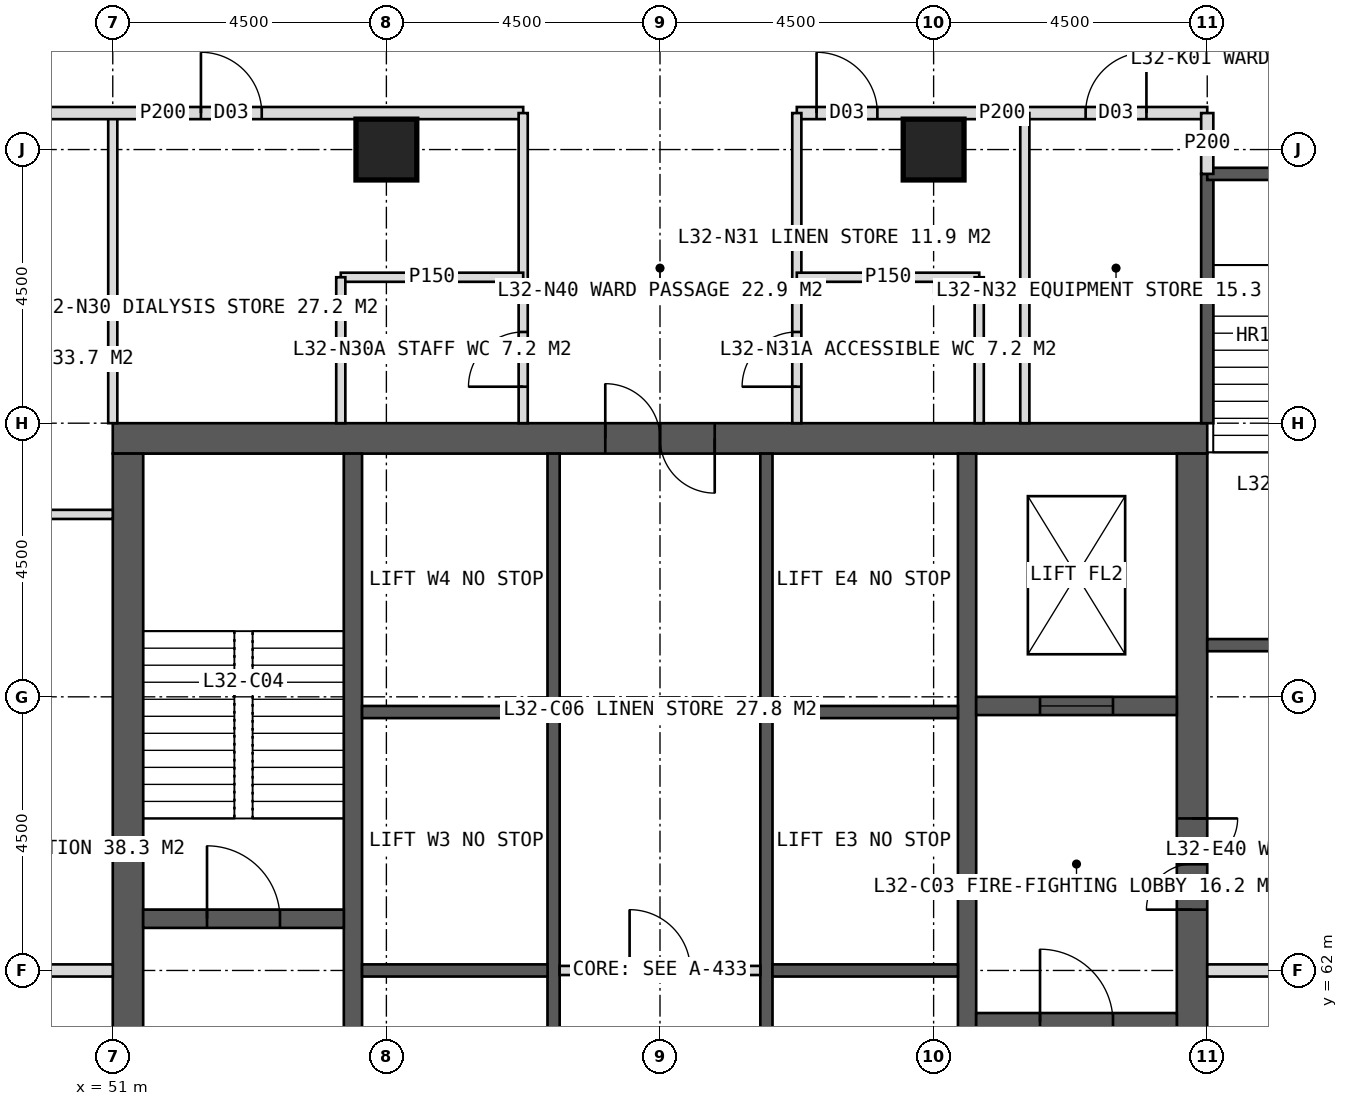
"""IFC4 building model, lengths in metres.
Left out: names, types, materials, properties, quantities, classifications, styles, units other than length and angle.
Written with IfcOpenShell. Run it as: python <this file> out.ifc"""

import sys

from ifc_helpers import new_model, si_unit, direction, frame, frame_2d, origin, origin_2d, place, context, subcontext, project, spatial, rectangle, hollow_rectangle, extrude, element, fill, save


model = new_model("IFC4")
c1 = context("Model", 3, precision=1e-05, world=origin(), true_north=direction((0.0, 1.0)))
c2 = subcontext(c1, "Body", "Model", "MODEL_VIEW")
j1 = project(units=[si_unit("LENGTHUNIT", "METRE"), si_unit("PLANEANGLEUNIT", "RADIAN")], contexts=[c1])
p1 = place(None, origin())
s1 = spatial("IfcSite", under=j1, at=p1, CompositionType="ELEMENT")
p2 = place(p1, origin())
s2 = spatial("IfcBuilding", under=s1, at=p2, CompositionType="ELEMENT")
p3 = place(p2, frame((0.0, 0.0, 136.0)))
s3 = spatial("IfcBuildingStorey", under=s2, at=p3, CompositionType="ELEMENT", Elevation=136.0)
p4 = place(p3, frame((51.0, 70.75, 0.0), z_axis=(0.0, 0.0, 1.0), x_axis=(1.0, 0.0, 0.0)))
e1 = element("IfcWall", 1, at=p4, inside=s3, PredefinedType="SHEAR", context=c2, shape_type="SweptSolid", body=[
    extrude(rectangle(XDim=18.0, YDim=0.5, at=frame_2d((9.0, 0.0))), origin(), (0.0, 0.0, 1.0), 4.0),
])
p5 = place(p4, frame((8.1, 0.0, 0.0)))
e2 = element("IfcOpeningElement", 2, at=p5, cuts=e1, PredefinedType="OPENING", context=c2, shape_type="SweptSolid", body=[
    extrude(rectangle(XDim=1.8, YDim=2.2, at=frame_2d((0.9, 1.1))), frame((0.0, 0.26, 0.0), z_axis=(0.0, -1.0, 0.0), x_axis=(1.0, 0.0, 0.0)), (0.0, 0.0, 1.0), 0.52),
])
p6 = place(p3, frame((51.25, 53.5, 0.0), z_axis=(0.0, 0.0, 1.0), x_axis=(0.0, 1.0, 0.0)))
e3 = element("IfcWall", 3, at=p6, inside=s3, PredefinedType="SHEAR", context=c2, shape_type="SweptSolid", body=[
    extrude(rectangle(XDim=17.0, YDim=0.5, at=frame_2d((8.5, 0.0))), origin(), (0.0, 0.0, 1.0), 4.0),
])
p7 = place(p6, frame((6.0, 0.0, 0.0)))
e4 = element("IfcOpeningElement", 4, at=p7, cuts=e3, PredefinedType="OPENING", context=c2, shape_type="SweptSolid", body=[
    extrude(rectangle(XDim=1.5, YDim=2.2, at=frame_2d((0.75, 1.1))), frame((0.0, 0.26, 0.0), z_axis=(0.0, -1.0, 0.0), x_axis=(1.0, 0.0, 0.0)), (0.0, 0.0, 1.0), 0.52),
])
p8 = place(p3, frame((68.75, 53.5, 0.0), z_axis=(0.0, 0.0, 1.0), x_axis=(0.0, 1.0, 0.0)))
e5 = element("IfcWall", 5, at=p8, inside=s3, PredefinedType="SHEAR", context=c2, shape_type="SweptSolid", body=[
    extrude(rectangle(XDim=17.0, YDim=0.5, at=frame_2d((8.5, 0.0))), origin(), (0.0, 0.0, 1.0), 4.0),
])
p9 = place(p8, frame((9.5, 0.0, 0.0)))
e6 = element("IfcOpeningElement", 6, at=p9, cuts=e5, PredefinedType="OPENING", context=c2, shape_type="SweptSolid", body=[
    extrude(rectangle(XDim=1.5, YDim=2.2, at=frame_2d((0.75, 1.1))), frame((0.0, 0.26, 0.0), z_axis=(0.0, -1.0, 0.0), x_axis=(1.0, 0.0, 0.0)), (0.0, 0.0, 1.0), 0.52),
])
for number, where, z_axis, x_axis in (
    (7, (54.95, 53.5, 0.0), (0.0, 0.0, 1.0), (0.0, 1.0, 0.0)),
    (8, (65.05, 53.5, 0.0), (0.0, 0.0, 1.0), (0.0, 1.0, 0.0)),
):
    element("IfcWall", number, at=place(p3, frame(where, z_axis=z_axis, x_axis=x_axis)), inside=s3, PredefinedType="SHEAR", context=c2, shape_type="SweptSolid", body=[
        extrude(rectangle(XDim=17.0, YDim=0.3, at=frame_2d((8.5, 0.0))), origin(), (0.0, 0.0, 1.0), 4.0),
    ])
p10 = place(p3, frame((58.25, 53.5, 0.0), z_axis=(0.0, 0.0, 1.0), x_axis=(0.0, 1.0, 0.0)))
e9 = element("IfcWall", 9, at=p10, inside=s3, PredefinedType="SHEAR", context=c2, shape_type="SweptSolid", body=[
    extrude(rectangle(XDim=17.0, YDim=0.2, at=frame_2d((8.5, 0.0))), origin(), (0.0, 0.0, 1.0), 4.0),
])
p11 = place(p10, frame((1.375, 0.0, 0.0)))
e10 = element("IfcOpeningElement", 10, at=p11, cuts=e9, PredefinedType="OPENING", context=c2, shape_type="SweptSolid", body=[
    extrude(rectangle(XDim=1.4, YDim=2.2, at=frame_2d((0.7, 1.1))), frame((0.0, 0.11, 0.0), z_axis=(0.0, -1.0, 0.0), x_axis=(1.0, 0.0, 0.0)), (0.0, 0.0, 1.0), 0.22),
])
p12 = place(p10, frame((5.675, 0.0, 0.0)))
e11 = element("IfcOpeningElement", 11, at=p12, cuts=e9, PredefinedType="OPENING", context=c2, shape_type="SweptSolid", body=[
    extrude(rectangle(XDim=1.4, YDim=2.2, at=frame_2d((0.7, 1.1))), frame((0.0, 0.11, 0.0), z_axis=(0.0, -1.0, 0.0), x_axis=(1.0, 0.0, 0.0)), (0.0, 0.0, 1.0), 0.22),
])
p13 = place(p3, frame((61.75, 53.5, 0.0), z_axis=(0.0, 0.0, 1.0), x_axis=(0.0, 1.0, 0.0)))
e12 = element("IfcWall", 12, at=p13, inside=s3, PredefinedType="SHEAR", context=c2, shape_type="SweptSolid", body=[
    extrude(rectangle(XDim=17.0, YDim=0.2, at=frame_2d((8.5, 0.0))), origin(), (0.0, 0.0, 1.0), 4.0),
])
p14 = place(p13, frame((1.375, 0.0, 0.0)))
e13 = element("IfcOpeningElement", 13, at=p14, cuts=e12, PredefinedType="OPENING", context=c2, shape_type="SweptSolid", body=[
    extrude(rectangle(XDim=1.4, YDim=2.2, at=frame_2d((0.7, 1.1))), frame((0.0, 0.11, 0.0), z_axis=(0.0, -1.0, 0.0), x_axis=(1.0, 0.0, 0.0)), (0.0, 0.0, 1.0), 0.22),
])
p15 = place(p13, frame((5.675, 0.0, 0.0)))
e14 = element("IfcOpeningElement", 14, at=p15, cuts=e12, PredefinedType="OPENING", context=c2, shape_type="SweptSolid", body=[
    extrude(rectangle(XDim=1.4, YDim=2.2, at=frame_2d((0.7, 1.1))), frame((0.0, 0.11, 0.0), z_axis=(0.0, -1.0, 0.0), x_axis=(1.0, 0.0, 0.0)), (0.0, 0.0, 1.0), 0.22),
])
for number, where, z_axis, x_axis in (
    (15, (55.1, 62.0, 0.0), (0.0, 0.0, 1.0), (1.0, 0.0, 0.0)),
    (16, (61.85, 62.0, 0.0), (0.0, 0.0, 1.0), (1.0, 0.0, 0.0)),
    (17, (55.1, 66.25, 0.0), (0.0, 0.0, 1.0), (1.0, 0.0, 0.0)),
    (18, (61.85, 66.25, 0.0), (0.0, 0.0, 1.0), (1.0, 0.0, 0.0)),
):
    element("IfcWall", number, at=place(p3, frame(where, z_axis=z_axis, x_axis=x_axis)), inside=s3, PredefinedType="SHEAR", context=c2, shape_type="SweptSolid", body=[
        extrude(rectangle(XDim=3.05, YDim=0.2, at=frame_2d((1.525, 0.0))), origin(), (0.0, 0.0, 1.0), 4.0),
    ])
p16 = place(p3, frame((51.5, 62.85, 0.0), z_axis=(0.0, 0.0, 1.0), x_axis=(1.0, 0.0, 0.0)))
e19 = element("IfcWall", 19, at=p16, inside=s3, PredefinedType="SHEAR", context=c2, shape_type="SweptSolid", body=[
    extrude(rectangle(XDim=3.3, YDim=0.3, at=frame_2d((1.65, 0.0))), origin(), (0.0, 0.0, 1.0), 4.0),
])
p17 = place(p16, frame((1.05, 0.0, 0.0)))
e20 = element("IfcOpeningElement", 20, at=p17, cuts=e19, PredefinedType="OPENING", context=c2, shape_type="SweptSolid", body=[
    extrude(rectangle(XDim=1.2, YDim=2.1, at=frame_2d((0.6, 1.05))), frame((0.0, 0.16, 0.0), z_axis=(0.0, -1.0, 0.0), x_axis=(1.0, 0.0, 0.0)), (0.0, 0.0, 1.0), 0.32),
])
p18 = place(p3, frame((65.2, 61.15, 0.0), z_axis=(0.0, 0.0, 1.0), x_axis=(1.0, 0.0, 0.0)))
e21 = element("IfcWall", 21, at=p18, inside=s3, PredefinedType="SHEAR", context=c2, shape_type="SweptSolid", body=[
    extrude(rectangle(XDim=3.3, YDim=0.3, at=frame_2d((1.65, 0.0))), origin(), (0.0, 0.0, 1.0), 4.0),
])
p19 = place(p18, frame((1.05, 0.0, 0.0)))
e22 = element("IfcOpeningElement", 22, at=p19, cuts=e21, PredefinedType="OPENING", context=c2, shape_type="SweptSolid", body=[
    extrude(rectangle(XDim=1.2, YDim=2.1, at=frame_2d((0.6, 1.05))), frame((0.0, 0.16, 0.0), z_axis=(0.0, -1.0, 0.0), x_axis=(1.0, 0.0, 0.0)), (0.0, 0.0, 1.0), 0.32),
])
p20 = place(p3, frame((65.2, 66.35, 0.0), z_axis=(0.0, 0.0, 1.0), x_axis=(1.0, 0.0, 0.0)))
e23 = element("IfcWall", 23, at=p20, inside=s3, PredefinedType="SHEAR", context=c2, shape_type="SweptSolid", body=[
    extrude(rectangle(XDim=3.3, YDim=0.3, at=frame_2d((1.65, 0.0))), origin(), (0.0, 0.0, 1.0), 4.0),
])
p21 = place(p20, frame((1.05, 0.0, 0.0)))
e24 = element("IfcOpeningElement", 24, at=p21, cuts=e23, PredefinedType="OPENING", context=c2, shape_type="SweptSolid", body=[
    extrude(rectangle(XDim=1.2, YDim=2.2, at=frame_2d((0.6, 1.1))), frame((0.0, 0.16, 0.0), z_axis=(0.0, -1.0, 0.0), x_axis=(1.0, 0.0, 0.0)), (0.0, 0.0, 1.0), 0.32),
])
for number, where, z_axis, x_axis in (
    (25, (55.5, 75.5, 0.0), (0.0, 0.0, 1.0), (1.0, 0.0, 0.0)),
    (26, (64.5, 75.5, 0.0), (0.0, 0.0, 1.0), (1.0, 0.0, 0.0)),
):
    element("IfcColumn", number, at=place(p3, frame(where, z_axis=z_axis, x_axis=x_axis)), inside=s3, PredefinedType="COLUMN", context=c2, shape_type="SweptSolid", body=[
        extrude(hollow_rectangle(XDim=1.0, YDim=1.0, WallThickness=0.1, at=origin_2d()), origin(), (0.0, 0.0, 1.0), 4.0),
    ])
p22 = place(p3, frame((51.0, 71.0, 0.0), z_axis=(0.0, 0.0, 1.0), x_axis=(0.0, 1.0, 0.0)))
e27 = element("IfcWall", 27, at=p22, inside=s3, PredefinedType="PARTITIONING", context=c2, shape_type="SweptSolid", body=[
    extrude(rectangle(XDim=5.1, YDim=0.15, at=frame_2d((2.55, 0.0))), origin(), (0.0, 0.0, 1.0), 3.75),
])
p23 = place(p3, frame((45.9, 76.1, 0.0), z_axis=(0.0, 0.0, 1.0), x_axis=(1.0, 0.0, 0.0)))
e28 = element("IfcWall", 28, at=p23, inside=s3, PredefinedType="PARTITIONING", context=c2, shape_type="SweptSolid", body=[
    extrude(rectangle(XDim=11.85, YDim=0.2, at=frame_2d((5.925, 0.0))), origin(), (0.0, 0.0, 1.0), 3.75),
])
p24 = place(p23, frame((6.55, 0.0, 0.0)))
e29 = element("IfcOpeningElement", 29, at=p24, cuts=e28, PredefinedType="OPENING", context=c2, shape_type="SweptSolid", body=[
    extrude(rectangle(XDim=1.0, YDim=2.1, at=frame_2d((0.5, 1.05))), frame((0.0, 0.11, 0.0), z_axis=(0.0, -1.0, 0.0), x_axis=(1.0, 0.0, 0.0)), (0.0, 0.0, 1.0), 0.22),
])
p25 = place(p3, frame((62.25, 76.1, 0.0), z_axis=(0.0, 0.0, 1.0), x_axis=(1.0, 0.0, 0.0)))
e30 = element("IfcWall", 30, at=p25, inside=s3, PredefinedType="PARTITIONING", context=c2, shape_type="SweptSolid", body=[
    extrude(rectangle(XDim=6.75, YDim=0.2, at=frame_2d((3.375, 0.0))), origin(), (0.0, 0.0, 1.0), 3.75),
])
p26 = place(p25, frame((0.325, 0.0, 0.0)))
e31 = element("IfcOpeningElement", 31, at=p26, cuts=e30, PredefinedType="OPENING", context=c2, shape_type="SweptSolid", body=[
    extrude(rectangle(XDim=1.0, YDim=2.1, at=frame_2d((0.5, 1.05))), frame((0.0, 0.11, 0.0), z_axis=(0.0, -1.0, 0.0), x_axis=(1.0, 0.0, 0.0)), (0.0, 0.0, 1.0), 0.22),
])
p27 = place(p25, frame((4.75, 0.0, 0.0)))
e32 = element("IfcOpeningElement", 32, at=p27, cuts=e30, PredefinedType="OPENING", context=c2, shape_type="SweptSolid", body=[
    extrude(rectangle(XDim=1.0, YDim=2.1, at=frame_2d((0.5, 1.05))), frame((0.0, 0.11, 0.0), z_axis=(0.0, -1.0, 0.0), x_axis=(1.0, 0.0, 0.0)), (0.0, 0.0, 1.0), 0.22),
])
p28 = place(p3, frame((57.75, 71.0, 0.0), z_axis=(0.0, 0.0, 1.0), x_axis=(0.0, 1.0, 0.0)))
e33 = element("IfcWall", 33, at=p28, inside=s3, PredefinedType="PARTITIONING", context=c2, shape_type="SweptSolid", body=[
    extrude(rectangle(XDim=5.1, YDim=0.15, at=frame_2d((2.55, 0.0))), origin(), (0.0, 0.0, 1.0), 3.75),
])
p29 = place(p28, frame((0.6, 0.0, 0.0)))
e34 = element("IfcOpeningElement", 34, at=p29, cuts=e33, PredefinedType="OPENING", context=c2, shape_type="SweptSolid", body=[
    extrude(rectangle(XDim=0.9, YDim=2.1, at=frame_2d((0.45, 1.05))), frame((0.0, 0.085, 0.0), z_axis=(0.0, -1.0, 0.0), x_axis=(1.0, 0.0, 0.0)), (0.0, 0.0, 1.0), 0.17),
])
p30 = place(p3, frame((62.25, 71.0, 0.0), z_axis=(0.0, 0.0, 1.0), x_axis=(0.0, 1.0, 0.0)))
e35 = element("IfcWall", 35, at=p30, inside=s3, PredefinedType="PARTITIONING", context=c2, shape_type="SweptSolid", body=[
    extrude(rectangle(XDim=5.1, YDim=0.15, at=frame_2d((2.55, 0.0))), origin(), (0.0, 0.0, 1.0), 3.75),
])
p31 = place(p30, frame((0.6, 0.0, 0.0)))
e36 = element("IfcOpeningElement", 36, at=p31, cuts=e35, PredefinedType="OPENING", context=c2, shape_type="SweptSolid", body=[
    extrude(rectangle(XDim=0.9, YDim=2.1, at=frame_2d((0.45, 1.05))), frame((0.0, 0.085, 0.0), z_axis=(0.0, -1.0, 0.0), x_axis=(1.0, 0.0, 0.0)), (0.0, 0.0, 1.0), 0.17),
])
p32 = place(p3, frame((66.0, 71.0, 0.0), z_axis=(0.0, 0.0, 1.0), x_axis=(0.0, 1.0, 0.0)))
e37 = element("IfcWall", 37, at=p32, inside=s3, PredefinedType="PARTITIONING", context=c2, shape_type="SweptSolid", body=[
    extrude(rectangle(XDim=5.1, YDim=0.15, at=frame_2d((2.55, 0.0))), origin(), (0.0, 0.0, 1.0), 3.75),
])
p33 = place(p3, frame((54.75, 73.4, 0.0), z_axis=(0.0, 0.0, 1.0), x_axis=(1.0, 0.0, 0.0)))
e38 = element("IfcWall", 38, at=p33, inside=s3, PredefinedType="PARTITIONING", context=c2, shape_type="SweptSolid", body=[
    extrude(rectangle(XDim=3.0, YDim=0.15, at=frame_2d((1.5, 0.0))), origin(), (0.0, 0.0, 1.0), 3.75),
])
p34 = place(p3, frame((54.75, 71.0, 0.0), z_axis=(0.0, 0.0, 1.0), x_axis=(0.0, 1.0, 0.0)))
e39 = element("IfcWall", 39, at=p34, inside=s3, PredefinedType="PARTITIONING", context=c2, shape_type="SweptSolid", body=[
    extrude(rectangle(XDim=2.4, YDim=0.15, at=frame_2d((1.2, 0.0))), origin(), (0.0, 0.0, 1.0), 3.75),
])
p35 = place(p3, frame((62.25, 73.4, 0.0), z_axis=(0.0, 0.0, 1.0), x_axis=(1.0, 0.0, 0.0)))
e40 = element("IfcWall", 40, at=p35, inside=s3, PredefinedType="PARTITIONING", context=c2, shape_type="SweptSolid", body=[
    extrude(rectangle(XDim=3.0, YDim=0.15, at=frame_2d((1.5, 0.0))), origin(), (0.0, 0.0, 1.0), 3.75),
])
p36 = place(p3, frame((65.25, 71.0, 0.0), z_axis=(0.0, 0.0, 1.0), x_axis=(0.0, 1.0, 0.0)))
e41 = element("IfcWall", 41, at=p36, inside=s3, PredefinedType="PARTITIONING", context=c2, shape_type="SweptSolid", body=[
    extrude(rectangle(XDim=2.4, YDim=0.15, at=frame_2d((1.2, 0.0))), origin(), (0.0, 0.0, 1.0), 3.75),
])
p37 = place(p3, frame((51.0, 62.0, 0.0), z_axis=(0.0, 0.0, 1.0), x_axis=(-1.0, 0.0, 0.0)))
e42 = element("IfcWall", 42, at=p37, inside=s3, PredefinedType="SOLIDWALL", context=c2, shape_type="SweptSolid", body=[
    extrude(rectangle(XDim=5.1, YDim=0.2, at=frame_2d((2.55, 0.0))), origin(), (0.0, 0.0, 1.0), 2.95),
])
p38 = place(p3, frame((51.0, 69.5, 0.0), z_axis=(0.0, 0.0, 1.0), x_axis=(-1.0, 0.0, 0.0)))
e43 = element("IfcWall", 43, at=p38, inside=s3, PredefinedType="PARTITIONING", context=c2, shape_type="SweptSolid", body=[
    extrude(rectangle(XDim=5.1, YDim=0.15, at=frame_2d((2.55, 0.0))), origin(), (0.0, 0.0, 1.0), 3.75),
])
p39 = place(p3, frame((69.0, 62.0, 0.0), z_axis=(0.0, 0.0, 1.0), x_axis=(1.0, 0.0, 0.0)))
e44 = element("IfcWall", 44, at=p39, inside=s3, PredefinedType="SOLIDWALL", context=c2, shape_type="SweptSolid", body=[
    extrude(rectangle(XDim=5.1, YDim=0.2, at=frame_2d((2.55, 0.0))), origin(), (0.0, 0.0, 1.0), 2.95),
])
p40 = place(p3, frame((58.35, 62.0, 0.0), z_axis=(0.0, 0.0, 1.0), x_axis=(1.0, 0.0, 0.0)))
e45 = element("IfcWall", 45, at=p40, inside=s3, PredefinedType="PARTITIONING", context=c2, shape_type="SweptSolid", body=[
    extrude(rectangle(XDim=3.3, YDim=0.15, at=frame_2d((1.65, 0.0))), origin(), (0.0, 0.0, 1.0), 3.75),
])
p41 = place(p40, frame((1.15, 0.0, 0.0)))
e46 = element("IfcOpeningElement", 46, at=p41, cuts=e45, PredefinedType="OPENING", context=c2, shape_type="SweptSolid", body=[
    extrude(rectangle(XDim=1.0, YDim=2.1, at=frame_2d((0.5, 1.05))), frame((0.0, 0.085, 0.0), z_axis=(0.0, -1.0, 0.0), x_axis=(1.0, 0.0, 0.0)), (0.0, 0.0, 1.0), 0.17),
])
p42 = place(p3, frame((69.0, 71.0, 0.0), z_axis=(0.0, 0.0, 1.0), x_axis=(0.0, 1.0, 0.0)))
e47 = element("IfcWall", 47, at=p42, inside=s3, PredefinedType="SOLIDWALL", context=c2, shape_type="SweptSolid", body=[
    extrude(rectangle(XDim=4.1, YDim=0.2, at=frame_2d((2.05, 0.0))), origin(), (0.0, 0.0, 1.0), 3.75),
])
p43 = place(p3, frame((69.0, 67.35, 0.0), z_axis=(0.0, 0.0, 1.0), x_axis=(1.0, 0.0, 0.0)))
e48 = element("IfcWall", 48, at=p43, inside=s3, PredefinedType="SOLIDWALL", context=c2, shape_type="SweptSolid", body=[
    extrude(rectangle(XDim=3.5, YDim=0.2, at=frame_2d((1.75, 0.0))), origin(), (0.0, 0.0, 1.0), 3.75),
])
p44 = place(p3, frame((69.0, 75.1, 0.0), z_axis=(0.0, 0.0, 1.0), x_axis=(1.0, 0.0, 0.0)))
e49 = element("IfcWall", 49, at=p44, inside=s3, PredefinedType="SOLIDWALL", context=c2, shape_type="SweptSolid", body=[
    extrude(rectangle(XDim=3.5, YDim=0.2, at=frame_2d((1.75, 0.0))), origin(), (0.0, 0.0, 1.0), 3.75),
])
p45 = place(p44, frame((1.15, 0.0, 0.0)))
e50 = element("IfcOpeningElement", 50, at=p45, cuts=e49, PredefinedType="OPENING", context=c2, shape_type="SweptSolid", body=[
    extrude(rectangle(XDim=1.2, YDim=2.1, at=frame_2d((0.6, 1.05))), frame((0.0, 0.11, 0.0), z_axis=(0.0, -1.0, 0.0), x_axis=(1.0, 0.0, 0.0)), (0.0, 0.0, 1.0), 0.22),
])
p46 = place(p3, frame((69.0, 75.1, 0.0), z_axis=(0.0, 0.0, 1.0), x_axis=(0.0, 1.0, 0.0)))
e51 = element("IfcWall", 51, at=p46, inside=s3, PredefinedType="PARTITIONING", context=c2, shape_type="SweptSolid", body=[
    extrude(rectangle(XDim=1.0, YDim=0.2, at=frame_2d((0.5, 0.0))), origin(), (0.0, 0.0, 1.0), 3.75),
])
p47 = place(p29, origin())
e52 = element("IfcDoor", 52, at=p47, inside=s3, OperationType="SINGLE_SWING_LEFT", PredefinedType="DOOR", context=c2, shape_type="SweptSolid", body=[
    extrude(rectangle(XDim=0.9, YDim=2.1, at=frame_2d((0.45, 1.05))), frame((0.0, 0.025, 0.0), z_axis=(0.0, -1.0, 0.0), x_axis=(1.0, 0.0, 0.0)), (0.0, 0.0, 1.0), 0.05),
])
fill(e34, e52)
p48 = place(p24, origin())
e53 = element("IfcDoor", 53, at=p48, inside=s3, OperationType="SINGLE_SWING_LEFT", PredefinedType="DOOR", context=c2, shape_type="SweptSolid", body=[
    extrude(rectangle(XDim=1.0, YDim=2.1, at=frame_2d((0.5, 1.05))), frame((0.0, 0.025, 0.0), z_axis=(0.0, -1.0, 0.0), x_axis=(1.0, 0.0, 0.0)), (0.0, 0.0, 1.0), 0.05),
])
fill(e29, e53)
p49 = place(p31, origin())
e54 = element("IfcDoor", 54, at=p49, inside=s3, OperationType="SINGLE_SWING_LEFT", PredefinedType="DOOR", context=c2, shape_type="SweptSolid", body=[
    extrude(rectangle(XDim=0.9, YDim=2.1, at=frame_2d((0.45, 1.05))), frame((0.0, 0.025, 0.0), z_axis=(0.0, -1.0, 0.0), x_axis=(1.0, 0.0, 0.0)), (0.0, 0.0, 1.0), 0.05),
])
fill(e36, e54)
p50 = place(p26, origin())
e55 = element("IfcDoor", 55, at=p50, inside=s3, OperationType="SINGLE_SWING_LEFT", PredefinedType="DOOR", context=c2, shape_type="SweptSolid", body=[
    extrude(rectangle(XDim=1.0, YDim=2.1, at=frame_2d((0.5, 1.05))), frame((0.0, 0.025, 0.0), z_axis=(0.0, -1.0, 0.0), x_axis=(1.0, 0.0, 0.0)), (0.0, 0.0, 1.0), 0.05),
])
fill(e31, e55)
p51 = place(p27, origin())
e56 = element("IfcDoor", 56, at=p51, inside=s3, OperationType="SINGLE_SWING_RIGHT", PredefinedType="DOOR", context=c2, shape_type="SweptSolid", body=[
    extrude(rectangle(XDim=1.0, YDim=2.1, at=frame_2d((0.5, 1.05))), frame((0.0, 0.025, 0.0), z_axis=(0.0, -1.0, 0.0), x_axis=(1.0, 0.0, 0.0)), (0.0, 0.0, 1.0), 0.05),
])
fill(e32, e56)
p52 = place(p9, origin())
e57 = element("IfcDoor", 57, at=p52, inside=s3, OperationType="DOUBLE_DOOR_SINGLE_SWING", PredefinedType="DOOR", context=c2, shape_type="SweptSolid", body=[
    extrude(rectangle(XDim=1.5, YDim=2.2, at=frame_2d((0.75, 1.1))), frame((0.0, 0.025, 0.0), z_axis=(0.0, -1.0, 0.0), x_axis=(1.0, 0.0, 0.0)), (0.0, 0.0, 1.0), 0.05),
])
fill(e6, e57)
p53 = place(p17, origin())
e58 = element("IfcDoor", 58, at=p53, inside=s3, OperationType="SINGLE_SWING_LEFT", PredefinedType="DOOR", context=c2, shape_type="SweptSolid", body=[
    extrude(rectangle(XDim=1.2, YDim=2.1, at=frame_2d((0.6, 1.05))), frame((0.0, 0.025, 0.0), z_axis=(0.0, -1.0, 0.0), x_axis=(1.0, 0.0, 0.0)), (0.0, 0.0, 1.0), 0.05),
])
fill(e20, e58)
p54 = place(p19, origin())
e59 = element("IfcDoor", 59, at=p54, inside=s3, OperationType="SINGLE_SWING_LEFT", PredefinedType="DOOR", context=c2, shape_type="SweptSolid", body=[
    extrude(rectangle(XDim=1.2, YDim=2.1, at=frame_2d((0.6, 1.05))), frame((0.0, 0.025, 0.0), z_axis=(0.0, -1.0, 0.0), x_axis=(1.0, 0.0, 0.0)), (0.0, 0.0, 1.0), 0.05),
])
fill(e22, e59)
p55 = place(p21, origin())
e60 = element("IfcDoor", 60, at=p55, inside=s3, OperationType="SLIDING_TO_LEFT", PredefinedType="DOOR", context=c2, shape_type="SweptSolid", body=[
    extrude(rectangle(XDim=1.2, YDim=2.2, at=frame_2d((0.6, 1.1))), frame((0.0, 0.025, 0.0), z_axis=(0.0, -1.0, 0.0), x_axis=(1.0, 0.0, 0.0)), (0.0, 0.0, 1.0), 0.05),
])
fill(e24, e60)
p56 = place(p41, origin())
e61 = element("IfcDoor", 61, at=p56, inside=s3, OperationType="SINGLE_SWING_LEFT", PredefinedType="DOOR", context=c2, shape_type="SweptSolid", body=[
    extrude(rectangle(XDim=1.0, YDim=2.1, at=frame_2d((0.5, 1.05))), frame((0.0, 0.025, 0.0), z_axis=(0.0, -1.0, 0.0), x_axis=(1.0, 0.0, 0.0)), (0.0, 0.0, 1.0), 0.05),
])
fill(e46, e61)
p57 = place(p5, origin())
e62 = element("IfcDoor", 62, at=p57, inside=s3, OperationType="DOUBLE_DOOR_SINGLE_SWING", PredefinedType="DOOR", context=c2, shape_type="SweptSolid", body=[
    extrude(rectangle(XDim=1.8, YDim=2.2, at=frame_2d((0.9, 1.1))), frame((0.0, 0.025, 0.0), z_axis=(0.0, -1.0, 0.0), x_axis=(1.0, 0.0, 0.0)), (0.0, 0.0, 1.0), 0.05),
])
fill(e2, e62)
save(model, sys.argv[1])
